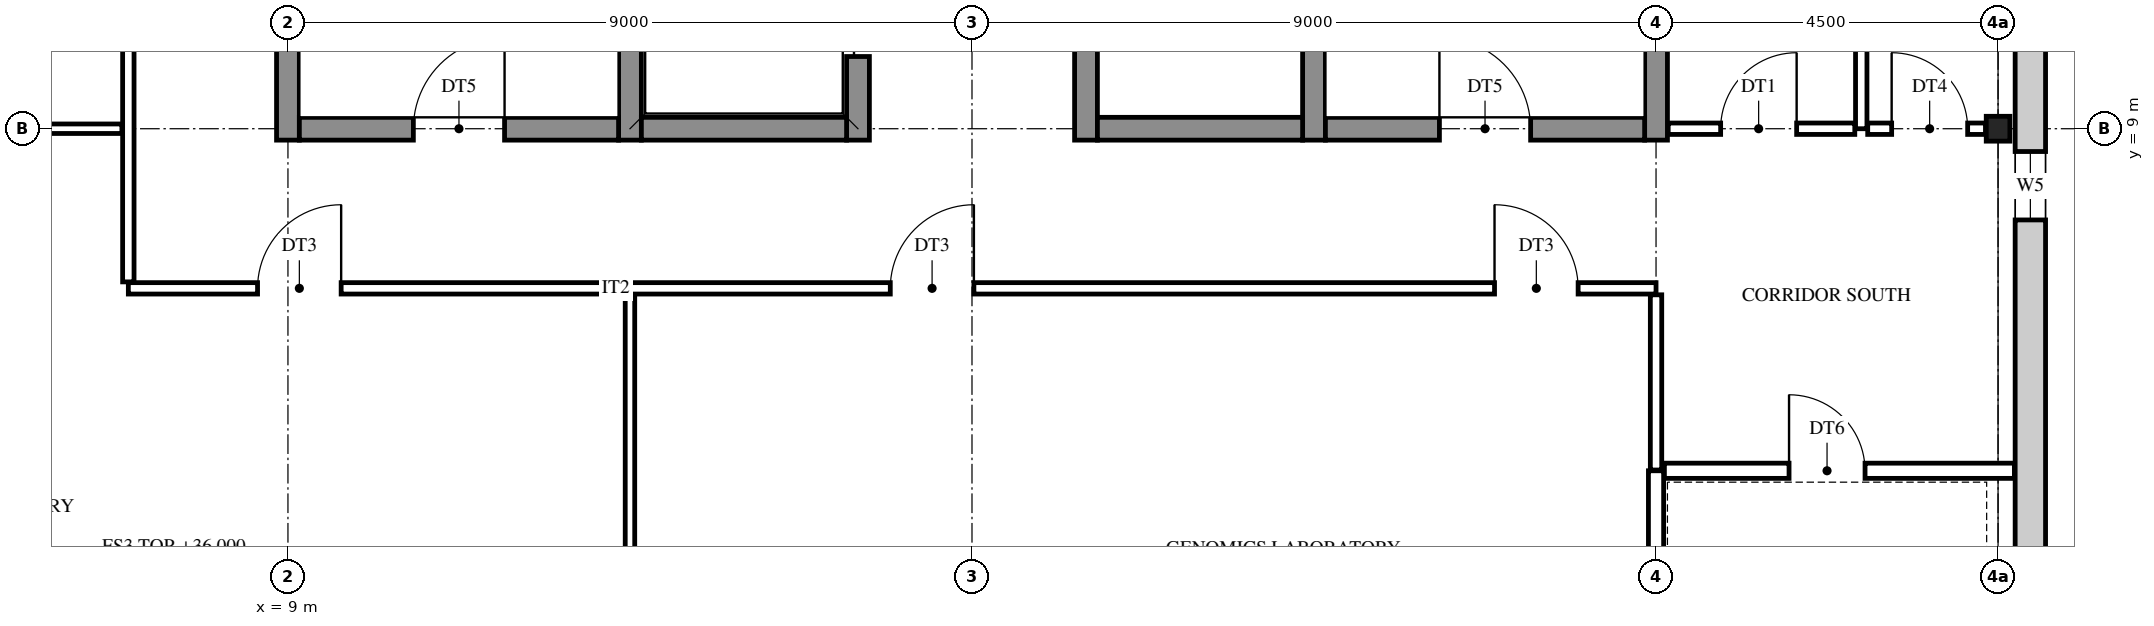
"""IFC4 building model, lengths in metres.
Left out: names, types, materials, properties, quantities, classifications, styles, units other than length and angle.
Written with IfcOpenShell. Run it as: python <this file> out.ifc"""

import sys

from ifc_helpers import new_model, si_unit, direction, frame, frame_2d, origin, origin_2d, place, context, subcontext, project, spatial, rectangle, i_section, extrude, element, fill, save


model = new_model("IFC4")
c1 = context("Model", 3, precision=1e-05, world=origin(), true_north=direction((0.0, 1.0)))
c2 = subcontext(c1, "Body", "Model", "MODEL_VIEW")
j1 = project(units=[si_unit("LENGTHUNIT", "METRE"), si_unit("PLANEANGLEUNIT", "RADIAN")], contexts=[c1])
p1 = place(None, origin())
s1 = spatial("IfcSite", under=j1, at=p1, CompositionType="ELEMENT")
p2 = place(p1, origin())
s2 = spatial("IfcBuilding", under=s1, at=p2, CompositionType="ELEMENT")
p3 = place(p2, frame((0.0, 0.0, 36.0)))
s3 = spatial("IfcBuildingStorey", under=s2, at=p3, CompositionType="ELEMENT", Elevation=36.0)
p4 = place(p3, frame((31.5, 9.0, 0.0), z_axis=(0.0, 0.0, 1.0), x_axis=(1.0, 0.0, 0.0)))
e1 = element("IfcColumn", 1, at=p4, inside=s3, PredefinedType="COLUMN", context=c2, shape_type="SweptSolid", body=[
    extrude(i_section(OverallWidth=0.311, OverallDepth=0.327, WebThickness=0.016, FlangeThickness=0.025, FilletRadius=0.017, at=origin_2d()), origin(), (0.0, 0.0, 1.0), 4.2),
])
for number, where, z_axis, x_axis in (
    (2, (9.0, 8.85, 0.0), (0.0, 0.0, 1.0), (0.0, 1.0, 0.0)),
    (3, (13.5, 8.85, 0.0), (0.0, 0.0, 1.0), (0.0, 1.0, 0.0)),
):
    element("IfcWall", number, at=place(p3, frame(where, z_axis=z_axis, x_axis=x_axis)), inside=s3, PredefinedType="SHEAR", context=c2, shape_type="SweptSolid", body=[
        extrude(rectangle(XDim=9.3, YDim=0.3, at=frame_2d((4.65, 0.0))), origin(), (0.0, 0.0, 1.0), 4.2),
    ])
p5 = place(p3, frame((16.5, 8.85, 0.0), z_axis=(0.0, 0.0, 1.0), x_axis=(0.0, 1.0, 0.0)))
e4 = element("IfcWall", 4, at=p5, inside=s3, PredefinedType="SHEAR", context=c2, shape_type="SweptSolid", body=[
    extrude(rectangle(XDim=9.3, YDim=0.3, at=frame_2d((4.65, 0.0))), origin(), (0.0, 0.0, 1.0), 4.2),
])
p6 = place(p5, frame((1.1, 0.0, 0.0)))
e5 = element("IfcOpeningElement", 5, at=p6, cuts=e4, PredefinedType="OPENING", context=c2, shape_type="SweptSolid", body=[
    extrude(rectangle(XDim=1.1, YDim=2.1, at=frame_2d((0.55, 1.05))), frame((0.0, 0.16, 0.0), z_axis=(0.0, -1.0, 0.0), x_axis=(1.0, 0.0, 0.0)), (0.0, 0.0, 1.0), 0.32),
])
p7 = place(p5, frame((4.1, 0.0, 0.0)))
e6 = element("IfcOpeningElement", 6, at=p7, cuts=e4, PredefinedType="OPENING", context=c2, shape_type="SweptSolid", body=[
    extrude(rectangle(XDim=1.1, YDim=2.1, at=frame_2d((0.55, 1.05))), frame((0.0, 0.16, 0.0), z_axis=(0.0, -1.0, 0.0), x_axis=(1.0, 0.0, 0.0)), (0.0, 0.0, 1.0), 0.32),
])
p8 = place(p3, frame((19.5, 8.85, 0.0), z_axis=(0.0, 0.0, 1.0), x_axis=(0.0, 1.0, 0.0)))
e7 = element("IfcWall", 7, at=p8, inside=s3, PredefinedType="SHEAR", context=c2, shape_type="SweptSolid", body=[
    extrude(rectangle(XDim=9.3, YDim=0.3, at=frame_2d((4.65, 0.0))), origin(), (0.0, 0.0, 1.0), 4.2),
])
p9 = place(p8, frame((3.95, 0.0, 0.0)))
e8 = element("IfcOpeningElement", 8, at=p9, cuts=e7, PredefinedType="OPENING", context=c2, shape_type="SweptSolid", body=[
    extrude(rectangle(XDim=1.4, YDim=2.1, at=frame_2d((0.7, 1.05))), frame((0.0, 0.16, 0.0), z_axis=(0.0, -1.0, 0.0), x_axis=(1.0, 0.0, 0.0)), (0.0, 0.0, 1.0), 0.32),
])
p10 = place(p8, frame((7.1, 0.0, 0.0)))
e9 = element("IfcOpeningElement", 9, at=p10, cuts=e7, PredefinedType="OPENING", context=c2, shape_type="SweptSolid", body=[
    extrude(rectangle(XDim=1.1, YDim=2.1, at=frame_2d((0.55, 1.05))), frame((0.0, 0.16, 0.0), z_axis=(0.0, -1.0, 0.0), x_axis=(1.0, 0.0, 0.0)), (0.0, 0.0, 1.0), 0.32),
])
for number, where, z_axis, x_axis in (
    (10, (22.5, 8.85, 0.0), (0.0, 0.0, 1.0), (0.0, 1.0, 0.0)),
    (11, (27.0, 8.85, 0.0), (0.0, 0.0, 1.0), (0.0, 1.0, 0.0)),
):
    element("IfcWall", number, at=place(p3, frame(where, z_axis=z_axis, x_axis=x_axis)), inside=s3, PredefinedType="SHEAR", context=c2, shape_type="SweptSolid", body=[
        extrude(rectangle(XDim=9.3, YDim=0.3, at=frame_2d((4.65, 0.0))), origin(), (0.0, 0.0, 1.0), 4.2),
    ])
p11 = place(p3, frame((9.15, 9.0, 0.0), z_axis=(0.0, 0.0, 1.0), x_axis=(1.0, 0.0, 0.0)))
e12 = element("IfcWall", 12, at=p11, inside=s3, PredefinedType="SHEAR", context=c2, shape_type="SweptSolid", body=[
    extrude(rectangle(XDim=4.2, YDim=0.3, at=frame_2d((2.1, 0.0))), origin(), (0.0, 0.0, 1.0), 4.2),
])
p12 = place(p11, frame((1.5, 0.0, 0.0)))
e13 = element("IfcOpeningElement", 13, at=p12, cuts=e12, PredefinedType="OPENING", context=c2, shape_type="SweptSolid", body=[
    extrude(rectangle(XDim=1.2, YDim=2.1, at=frame_2d((0.6, 1.05))), frame((0.0, 0.16, 0.0), z_axis=(0.0, -1.0, 0.0), x_axis=(1.0, 0.0, 0.0)), (0.0, 0.0, 1.0), 0.32),
])
for number, where, z_axis, x_axis in (
    (14, (13.65, 9.0, 0.0), (0.0, 0.0, 1.0), (1.0, 0.0, 0.0)),
    (15, (19.65, 9.0, 0.0), (0.0, 0.0, 1.0), (1.0, 0.0, 0.0)),
):
    element("IfcWall", number, at=place(p3, frame(where, z_axis=z_axis, x_axis=x_axis)), inside=s3, PredefinedType="SHEAR", context=c2, shape_type="SweptSolid", body=[
        extrude(rectangle(XDim=2.7, YDim=0.3, at=frame_2d((1.35, 0.0))), origin(), (0.0, 0.0, 1.0), 4.2),
    ])
p13 = place(p3, frame((22.65, 9.0, 0.0), z_axis=(0.0, 0.0, 1.0), x_axis=(1.0, 0.0, 0.0)))
e16 = element("IfcWall", 16, at=p13, inside=s3, PredefinedType="SHEAR", context=c2, shape_type="SweptSolid", body=[
    extrude(rectangle(XDim=4.2, YDim=0.3, at=frame_2d((2.1, 0.0))), origin(), (0.0, 0.0, 1.0), 4.2),
])
p14 = place(p13, frame((1.5, 0.0, 0.0)))
e17 = element("IfcOpeningElement", 17, at=p14, cuts=e16, PredefinedType="OPENING", context=c2, shape_type="SweptSolid", body=[
    extrude(rectangle(XDim=1.2, YDim=2.1, at=frame_2d((0.6, 1.05))), frame((0.0, 0.16, 0.0), z_axis=(0.0, -1.0, 0.0), x_axis=(1.0, 0.0, 0.0)), (0.0, 0.0, 1.0), 0.32),
])
p15 = place(p3, frame((31.925, 27.225, 0.0), z_axis=(0.0, 0.0, 1.0), x_axis=(0.0, -1.0, 0.0)))
e18 = element("IfcWall", 18, at=p15, inside=s3, PredefinedType="STANDARD", context=c2, shape_type="SweptSolid", body=[
    extrude(rectangle(XDim=27.45, YDim=0.4, at=frame_2d((13.725, 0.0))), origin(), (0.0, 0.0, 1.0), 4.2),
])
p16 = place(p15, frame((26.025, 0.0, 0.9)))
e19 = element("IfcOpeningElement", 19, at=p16, cuts=e18, PredefinedType="OPENING", context=c2, shape_type="SweptSolid", body=[
    extrude(rectangle(XDim=0.9, YDim=2.0, at=frame_2d((0.45, 1.0))), frame((0.0, 0.21, 0.0), z_axis=(0.0, -1.0, 0.0), x_axis=(1.0, 0.0, 0.0)), (0.0, 0.0, 1.0), 0.42),
])
p17 = place(p15, frame((18.525, 0.0, 0.9)))
e20 = element("IfcOpeningElement", 20, at=p17, cuts=e18, PredefinedType="OPENING", context=c2, shape_type="SweptSolid", body=[
    extrude(rectangle(XDim=0.9, YDim=2.0, at=frame_2d((0.45, 1.0))), frame((0.0, 0.21, 0.0), z_axis=(0.0, -1.0, 0.0), x_axis=(1.0, 0.0, 0.0)), (0.0, 0.0, 1.0), 0.42),
])
p18 = place(p15, frame((15.675, 0.0, 1.6)))
e21 = element("IfcOpeningElement", 21, at=p18, cuts=e18, PredefinedType="OPENING", context=c2, shape_type="SweptSolid", body=[
    extrude(rectangle(XDim=0.6, YDim=0.9, at=frame_2d((0.3, 0.45))), frame((0.0, 0.21, 0.0), z_axis=(0.0, -1.0, 0.0), x_axis=(1.0, 0.0, 0.0)), (0.0, 0.0, 1.0), 0.42),
])
p19 = place(p15, frame((11.175, 0.0, 1.6)))
e22 = element("IfcOpeningElement", 22, at=p19, cuts=e18, PredefinedType="OPENING", context=c2, shape_type="SweptSolid", body=[
    extrude(rectangle(XDim=0.6, YDim=0.9, at=frame_2d((0.3, 0.45))), frame((0.0, 0.21, 0.0), z_axis=(0.0, -1.0, 0.0), x_axis=(1.0, 0.0, 0.0)), (0.0, 0.0, 1.0), 0.42),
])
p20 = place(p15, frame((8.025, 0.0, 0.9)))
e23 = element("IfcOpeningElement", 23, at=p20, cuts=e18, PredefinedType="OPENING", context=c2, shape_type="SweptSolid", body=[
    extrude(rectangle(XDim=0.9, YDim=2.0, at=frame_2d((0.45, 1.0))), frame((0.0, 0.21, 0.0), z_axis=(0.0, -1.0, 0.0), x_axis=(1.0, 0.0, 0.0)), (0.0, 0.0, 1.0), 0.42),
])
p21 = place(p15, frame((0.525, 0.0, 0.9)))
e24 = element("IfcOpeningElement", 24, at=p21, cuts=e18, PredefinedType="OPENING", context=c2, shape_type="SweptSolid", body=[
    extrude(rectangle(XDim=0.9, YDim=2.0, at=frame_2d((0.45, 1.0))), frame((0.0, 0.21, 0.0), z_axis=(0.0, -1.0, 0.0), x_axis=(1.0, 0.0, 0.0)), (0.0, 0.0, 1.0), 0.42),
])
p22 = place(p3, frame((6.9, 6.985, 0.0), z_axis=(0.0, 0.0, 1.0), x_axis=(0.0, 1.0, 0.0)))
e25 = element("IfcWall", 25, at=p22, inside=s3, PredefinedType="PARTITIONING", context=c2, shape_type="SweptSolid", body=[
    extrude(rectangle(XDim=11.015, YDim=0.15, at=frame_2d((5.507, 0.0))), origin(), (0.0, 0.0, 1.0), 3.537),
])
p23 = place(p22, frame((5.965, 0.0, 0.0)))
e26 = element("IfcOpeningElement", 26, at=p23, cuts=e25, PredefinedType="OPENING", context=c2, shape_type="SweptSolid", body=[
    extrude(rectangle(XDim=1.1, YDim=2.1, at=frame_2d((0.55, 1.05))), frame((0.0, 0.085, 0.0), z_axis=(0.0, -1.0, 0.0), x_axis=(1.0, 0.0, 0.0)), (0.0, 0.0, 1.0), 0.17),
])
p24 = place(p3, frame((13.5, -0.226, 0.0), z_axis=(0.0, 0.0, 1.0), x_axis=(0.0, 1.0, 0.0)))
e27 = element("IfcWall", 27, at=p24, inside=s3, PredefinedType="PARTITIONING", context=c2, shape_type="SweptSolid", body=[
    extrude(rectangle(XDim=7.041, YDim=0.125, at=frame_2d((3.521, 0.0))), origin(), (0.0, 0.0, 1.0), 3.537),
])
p25 = place(p3, frame((27.0, 0.174, 0.0), z_axis=(0.0, 0.0, 1.0), x_axis=(0.0, 1.0, 0.0)))
e28 = element("IfcWall", 28, at=p25, inside=s3, PredefinedType="PARTITIONING", context=c2, shape_type="SweptSolid", body=[
    extrude(rectangle(XDim=4.326, YDim=0.2, at=frame_2d((2.163, 0.0))), origin(), (0.0, 0.0, 1.0), 3.537),
])
p26 = place(p3, frame((27.0, 4.51, 0.0), z_axis=(0.0, 0.0, 1.0), x_axis=(0.0, 1.0, 0.0)))
e29 = element("IfcWall", 29, at=p26, inside=s3, PredefinedType="PARTITIONING", context=c2, shape_type="SweptSolid", body=[
    extrude(rectangle(XDim=2.305, YDim=0.15, at=frame_2d((1.152, 0.0))), origin(), (0.0, 0.0, 1.0), 3.537),
])
p27 = place(p3, frame((29.7, 9.0, 0.0), z_axis=(0.0, 0.0, 1.0), x_axis=(0.0, 1.0, 0.0)))
e30 = element("IfcWall", 30, at=p27, inside=s3, PredefinedType="PARTITIONING", context=c2, shape_type="SweptSolid", body=[
    extrude(rectangle(XDim=6.3, YDim=0.15, at=frame_2d((3.15, 0.0))), origin(), (0.0, 0.0, 1.0), 3.537),
])
p28 = place(p27, frame((4.0, 0.0, 0.0)))
e31 = element("IfcOpeningElement", 31, at=p28, cuts=e30, PredefinedType="OPENING", context=c2, shape_type="SweptSolid", body=[
    extrude(rectangle(XDim=1.0, YDim=2.1, at=frame_2d((0.5, 1.05))), frame((0.0, 0.085, 0.0), z_axis=(0.0, -1.0, 0.0), x_axis=(1.0, 0.0, 0.0)), (0.0, 0.0, 1.0), 0.17),
])
p29 = place(p3, frame((27.11, 4.5, 0.0), z_axis=(0.0, 0.0, 1.0), x_axis=(1.0, 0.0, 0.0)))
e32 = element("IfcWall", 32, at=p29, inside=s3, PredefinedType="PARTITIONING", context=c2, shape_type="SweptSolid", body=[
    extrude(rectangle(XDim=4.605, YDim=0.2, at=frame_2d((2.302, 0.0))), origin(), (0.0, 0.0, 1.0), 3.537),
])
p30 = place(p29, frame((1.64, 0.0, 0.0)))
e33 = element("IfcOpeningElement", 33, at=p30, cuts=e32, PredefinedType="OPENING", context=c2, shape_type="SweptSolid", body=[
    extrude(rectangle(XDim=1.0, YDim=2.1, at=frame_2d((0.5, 1.05))), frame((0.0, 0.11, 0.0), z_axis=(0.0, -1.0, 0.0), x_axis=(1.0, 0.0, 0.0)), (0.0, 0.0, 1.0), 0.22),
])
p31 = place(p3, frame((6.9, 6.9, 0.0), z_axis=(0.0, 0.0, 1.0), x_axis=(1.0, 0.0, 0.0)))
e34 = element("IfcWall", 34, at=p31, inside=s3, PredefinedType="PARTITIONING", context=c2, shape_type="SweptSolid", body=[
    extrude(rectangle(XDim=20.1, YDim=0.15, at=frame_2d((10.05, 0.0))), origin(), (0.0, 0.0, 1.0), 3.537),
])
p32 = place(p31, frame((1.7, 0.0, 0.0)))
e35 = element("IfcOpeningElement", 35, at=p32, cuts=e34, PredefinedType="OPENING", context=c2, shape_type="SweptSolid", body=[
    extrude(rectangle(XDim=1.1, YDim=2.1, at=frame_2d((0.55, 1.05))), frame((0.0, 0.085, 0.0), z_axis=(0.0, -1.0, 0.0), x_axis=(1.0, 0.0, 0.0)), (0.0, 0.0, 1.0), 0.17),
])
p33 = place(p31, frame((17.975, 0.0, 0.0)))
e36 = element("IfcOpeningElement", 36, at=p33, cuts=e34, PredefinedType="OPENING", context=c2, shape_type="SweptSolid", body=[
    extrude(rectangle(XDim=1.1, YDim=2.1, at=frame_2d((0.55, 1.05))), frame((0.0, 0.085, 0.0), z_axis=(0.0, -1.0, 0.0), x_axis=(1.0, 0.0, 0.0)), (0.0, 0.0, 1.0), 0.17),
])
p34 = place(p31, frame((10.025, 0.0, 0.0)))
e37 = element("IfcOpeningElement", 37, at=p34, cuts=e34, PredefinedType="OPENING", context=c2, shape_type="SweptSolid", body=[
    extrude(rectangle(XDim=1.1, YDim=2.1, at=frame_2d((0.55, 1.05))), frame((0.0, 0.085, 0.0), z_axis=(0.0, -1.0, 0.0), x_axis=(1.0, 0.0, 0.0)), (0.0, 0.0, 1.0), 0.17),
])
p35 = place(p3, frame((0.166, 9.0, 0.0), z_axis=(0.0, 0.0, 1.0), x_axis=(1.0, 0.0, 0.0)))
e38 = element("IfcWall", 38, at=p35, inside=s3, PredefinedType="PARTITIONING", context=c2, shape_type="SweptSolid", body=[
    extrude(rectangle(XDim=6.649, YDim=0.125, at=frame_2d((3.325, 0.0))), origin(), (0.0, 0.0, 1.0), 3.537),
])
p36 = place(p3, frame((27.16, 9.0, 0.0), z_axis=(0.0, 0.0, 1.0), x_axis=(1.0, 0.0, 0.0)))
e39 = element("IfcWall", 39, at=p36, inside=s3, PredefinedType="PARTITIONING", context=c2, shape_type="SweptSolid", body=[
    extrude(rectangle(XDim=2.455, YDim=0.15, at=frame_2d((1.228, 0.0))), origin(), (0.0, 0.0, 1.0), 3.537),
])
p37 = place(p36, frame((0.69, 0.0, 0.0)))
e40 = element("IfcOpeningElement", 40, at=p37, cuts=e39, PredefinedType="OPENING", context=c2, shape_type="SweptSolid", body=[
    extrude(rectangle(XDim=1.0, YDim=2.1, at=frame_2d((0.5, 1.05))), frame((0.0, 0.085, 0.0), z_axis=(0.0, -1.0, 0.0), x_axis=(1.0, 0.0, 0.0)), (0.0, 0.0, 1.0), 0.17),
])
p38 = place(p3, frame((29.785, 9.0, 0.0), z_axis=(0.0, 0.0, 1.0), x_axis=(1.0, 0.0, 0.0)))
e41 = element("IfcWall", 41, at=p38, inside=s3, PredefinedType="PARTITIONING", context=c2, shape_type="SweptSolid", body=[
    extrude(rectangle(XDim=1.55, YDim=0.15, at=frame_2d((0.775, 0.0))), origin(), (0.0, 0.0, 1.0), 3.537),
])
p39 = place(p38, frame((0.315, 0.0, 0.0)))
e42 = element("IfcOpeningElement", 42, at=p39, cuts=e41, PredefinedType="OPENING", context=c2, shape_type="SweptSolid", body=[
    extrude(rectangle(XDim=1.0, YDim=2.1, at=frame_2d((0.5, 1.05))), frame((0.0, 0.085, 0.0), z_axis=(0.0, -1.0, 0.0), x_axis=(1.0, 0.0, 0.0)), (0.0, 0.0, 1.0), 0.17),
])
p40 = place(p17, origin())
e43 = element("IfcWindow", 43, at=p40, inside=s3, PartitioningType="SINGLE_PANEL", PredefinedType="WINDOW", context=c2, shape_type="SweptSolid", body=[
    extrude(rectangle(XDim=0.9, YDim=2.0, at=frame_2d((0.45, 1.0))), frame((0.0, 0.03, 0.0), z_axis=(0.0, -1.0, 0.0), x_axis=(1.0, 0.0, 0.0)), (0.0, 0.0, 1.0), 0.06),
])
fill(e20, e43)
p41 = place(p12, origin())
e44 = element("IfcDoor", 44, at=p41, inside=s3, OperationType="SINGLE_SWING_RIGHT", PredefinedType="DOOR", context=c2, shape_type="SweptSolid", body=[
    extrude(rectangle(XDim=1.2, YDim=2.1, at=frame_2d((0.6, 1.05))), frame((0.0, 0.025, 0.0), z_axis=(0.0, -1.0, 0.0), x_axis=(1.0, 0.0, 0.0)), (0.0, 0.0, 1.0), 0.05),
])
fill(e13, e44)
p42 = place(p14, origin())
e45 = element("IfcDoor", 45, at=p42, inside=s3, OperationType="SINGLE_SWING_LEFT", PredefinedType="DOOR", context=c2, shape_type="SweptSolid", body=[
    extrude(rectangle(XDim=1.2, YDim=2.1, at=frame_2d((0.6, 1.05))), frame((0.0, 0.025, 0.0), z_axis=(0.0, -1.0, 0.0), x_axis=(1.0, 0.0, 0.0)), (0.0, 0.0, 1.0), 0.05),
])
fill(e17, e45)
p43 = place(p37, origin())
e46 = element("IfcDoor", 46, at=p43, inside=s3, OperationType="SINGLE_SWING_RIGHT", PredefinedType="DOOR", context=c2, shape_type="SweptSolid", body=[
    extrude(rectangle(XDim=1.0, YDim=2.1, at=frame_2d((0.5, 1.05))), frame((0.0, 0.025, 0.0), z_axis=(0.0, -1.0, 0.0), x_axis=(1.0, 0.0, 0.0)), (0.0, 0.0, 1.0), 0.05),
])
fill(e40, e46)
p44 = place(p39, origin())
e47 = element("IfcDoor", 47, at=p44, inside=s3, OperationType="SINGLE_SWING_LEFT", PredefinedType="DOOR", context=c2, shape_type="SweptSolid", body=[
    extrude(rectangle(XDim=1.0, YDim=2.1, at=frame_2d((0.5, 1.05))), frame((0.0, 0.025, 0.0), z_axis=(0.0, -1.0, 0.0), x_axis=(1.0, 0.0, 0.0)), (0.0, 0.0, 1.0), 0.05),
])
fill(e42, e47)
p45 = place(p30, frame((1.0, 0.0, 0.0), z_axis=(0.0, 0.0, 1.0), x_axis=(-1.0, 0.0, 0.0)))
e48 = element("IfcDoor", 48, at=p45, inside=s3, OperationType="SINGLE_SWING_LEFT", PredefinedType="DOOR", context=c2, shape_type="SweptSolid", body=[
    extrude(rectangle(XDim=1.0, YDim=2.1, at=frame_2d((0.5, 1.05))), frame((0.0, 0.025, 0.0), z_axis=(0.0, -1.0, 0.0), x_axis=(1.0, 0.0, 0.0)), (0.0, 0.0, 1.0), 0.05),
])
fill(e33, e48)
p46 = place(p32, frame((1.1, 0.0, 0.0), z_axis=(0.0, 0.0, 1.0), x_axis=(-1.0, 0.0, 0.0)))
e49 = element("IfcDoor", 49, at=p46, inside=s3, OperationType="SINGLE_SWING_RIGHT", PredefinedType="DOOR", context=c2, shape_type="SweptSolid", body=[
    extrude(rectangle(XDim=1.1, YDim=2.1, at=frame_2d((0.55, 1.05))), frame((0.0, 0.025, 0.0), z_axis=(0.0, -1.0, 0.0), x_axis=(1.0, 0.0, 0.0)), (0.0, 0.0, 1.0), 0.05),
])
fill(e35, e49)
p47 = place(p33, frame((1.1, 0.0, 0.0), z_axis=(0.0, 0.0, 1.0), x_axis=(-1.0, 0.0, 0.0)))
e50 = element("IfcDoor", 50, at=p47, inside=s3, OperationType="SINGLE_SWING_LEFT", PredefinedType="DOOR", context=c2, shape_type="SweptSolid", body=[
    extrude(rectangle(XDim=1.1, YDim=2.1, at=frame_2d((0.55, 1.05))), frame((0.0, 0.025, 0.0), z_axis=(0.0, -1.0, 0.0), x_axis=(1.0, 0.0, 0.0)), (0.0, 0.0, 1.0), 0.05),
])
fill(e36, e50)
p48 = place(p34, frame((1.1, 0.0, 0.0), z_axis=(0.0, 0.0, 1.0), x_axis=(-1.0, 0.0, 0.0)))
e51 = element("IfcDoor", 51, at=p48, inside=s3, OperationType="SINGLE_SWING_RIGHT", PredefinedType="DOOR", context=c2, shape_type="SweptSolid", body=[
    extrude(rectangle(XDim=1.1, YDim=2.1, at=frame_2d((0.55, 1.05))), frame((0.0, 0.025, 0.0), z_axis=(0.0, -1.0, 0.0), x_axis=(1.0, 0.0, 0.0)), (0.0, 0.0, 1.0), 0.05),
])
fill(e37, e51)
p49 = place(p6, origin())
e52 = element("IfcDoor", 52, at=p49, inside=s3, OperationType="DOUBLE_DOOR_SLIDING", PredefinedType="DOOR", context=c2, shape_type="SweptSolid", body=[
    extrude(rectangle(XDim=1.1, YDim=2.1, at=frame_2d((0.55, 1.05))), frame((0.0, 0.025, 0.0), z_axis=(0.0, -1.0, 0.0), x_axis=(1.0, 0.0, 0.0)), (0.0, 0.0, 1.0), 0.05),
])
fill(e5, e52)
save(model, sys.argv[1])
